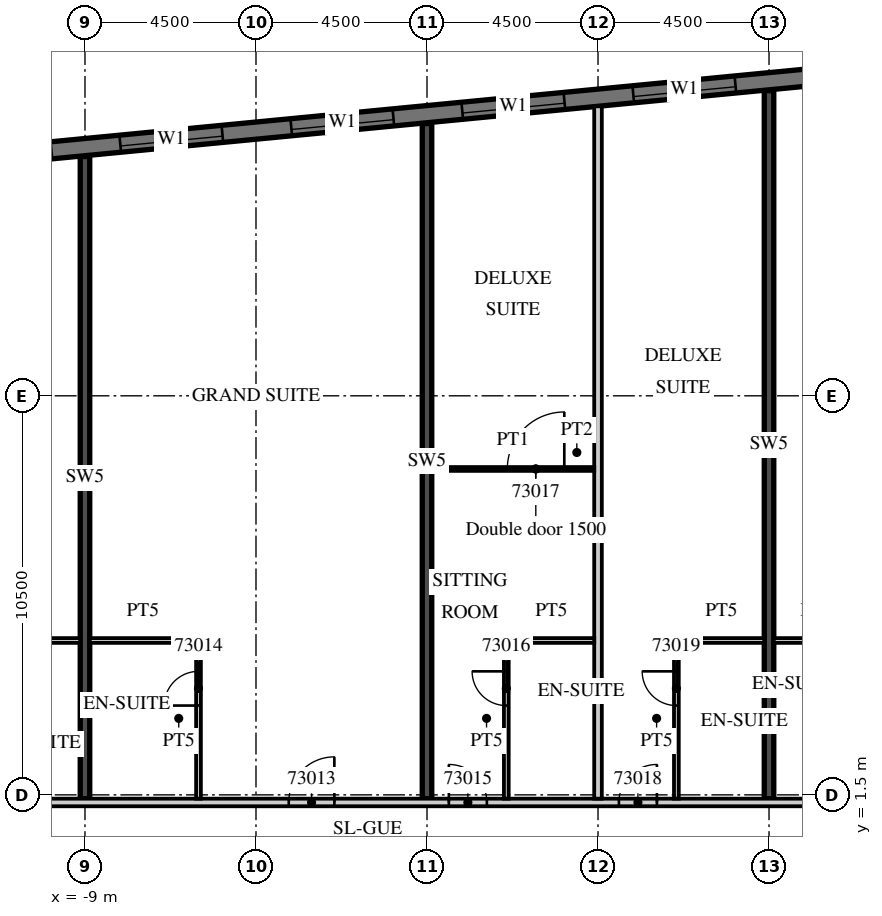
"""IFC4 building model, lengths in metres.
Left out: names, types, materials, properties, quantities, classifications, styles, units other than length and angle.
Written with IfcOpenShell. Run it as: python <this file> out.ifc"""

import sys

from ifc_helpers import new_model, si_unit, direction, frame, frame_2d, origin, place, context, subcontext, project, spatial, rectangle, extrude, element, fill, save


model = new_model("IFC4")
c1 = context("Model", 3, precision=1e-05, world=origin(), true_north=direction((0.0, 1.0)))
c2 = subcontext(c1, "Body", "Model", "MODEL_VIEW")
j1 = project(units=[si_unit("LENGTHUNIT", "METRE"), si_unit("PLANEANGLEUNIT", "RADIAN")], contexts=[c1])
p1 = place(None, origin())
s1 = spatial("IfcSite", under=j1, at=p1, CompositionType="ELEMENT")
p2 = place(p1, origin())
s2 = spatial("IfcBuilding", under=s1, at=p2, CompositionType="ELEMENT")
p3 = place(p2, frame((0.0, 0.0, 291.6)))
s3 = spatial("IfcBuildingStorey", under=s2, at=p3, CompositionType="ELEMENT", Elevation=291.6)
p4 = place(p3, frame((-9.0, 1.4, 0.0), z_axis=(0.0, 0.0, 1.0), x_axis=(0.0, 1.0, 0.0)))
e1 = element("IfcWall", 1, at=p4, inside=s3, PredefinedType="SHEAR", context=c2, shape_type="SweptSolid", body=[
    extrude(rectangle(XDim=16.896, YDim=0.25, at=frame_2d((8.448, 0.0))), origin(), (0.0, 0.0, 1.0), 3.3),
])
p5 = place(p3, frame((0.0, 1.4, 0.0), z_axis=(0.0, 0.0, 1.0), x_axis=(0.0, 1.0, 0.0)))
e2 = element("IfcWall", 2, at=p5, inside=s3, PredefinedType="SHEAR", context=c2, shape_type="SweptSolid", body=[
    extrude(rectangle(XDim=17.763, YDim=0.25, at=frame_2d((8.881, 0.0))), origin(), (0.0, 0.0, 1.0), 3.3),
])
p6 = place(p3, frame((9.0, 1.4, 0.0), z_axis=(0.0, 0.0, 1.0), x_axis=(0.0, 1.0, 0.0)))
e3 = element("IfcWall", 3, at=p6, inside=s3, PredefinedType="SHEAR", context=c2, shape_type="SweptSolid", body=[
    extrude(rectangle(XDim=18.629, YDim=0.25, at=frame_2d((9.315, 0.0))), origin(), (0.0, 0.0, 1.0), 3.3),
])
p7 = place(p3, frame((13.521, 20.713, 0.0), z_axis=(0.0, 0.0, 1.0), x_axis=(-0.995396277313, -0.095844932638, 0.0)))
e4 = element("IfcWall", 4, at=p7, inside=s3, PredefinedType="SOLIDWALL", context=c2, shape_type="SweptSolid", body=[
    extrude(rectangle(XDim=51.495, YDim=0.45, at=frame_2d((25.748, 0.0))), origin(), (0.0, 0.0, 1.0), 3.02),
])
p8 = place(p7, frame((0.91, 0.0, 0.45)))
e5 = element("IfcOpeningElement", 5, at=p8, cuts=e4, PredefinedType="OPENING", context=c2, shape_type="SweptSolid", body=[
    extrude(rectangle(XDim=2.7, YDim=2.25, at=frame_2d((1.35, 1.125))), frame((0.0, 0.235, 0.0), z_axis=(0.0, -1.0, 0.0), x_axis=(1.0, 0.0, 0.0)), (0.0, 0.0, 1.0), 0.47),
])
p9 = place(p7, frame((5.431, 0.0, 0.45)))
e6 = element("IfcOpeningElement", 6, at=p9, cuts=e4, PredefinedType="OPENING", context=c2, shape_type="SweptSolid", body=[
    extrude(rectangle(XDim=2.7, YDim=2.25, at=frame_2d((1.35, 1.125))), frame((0.0, 0.235, 0.0), z_axis=(0.0, -1.0, 0.0), x_axis=(1.0, 0.0, 0.0)), (0.0, 0.0, 1.0), 0.47),
])
p10 = place(p7, frame((9.952, 0.0, 0.45)))
e7 = element("IfcOpeningElement", 7, at=p10, cuts=e4, PredefinedType="OPENING", context=c2, shape_type="SweptSolid", body=[
    extrude(rectangle(XDim=2.7, YDim=2.25, at=frame_2d((1.35, 1.125))), frame((0.0, 0.235, 0.0), z_axis=(0.0, -1.0, 0.0), x_axis=(1.0, 0.0, 0.0)), (0.0, 0.0, 1.0), 0.47),
])
p11 = place(p7, frame((14.473, 0.0, 0.45)))
e8 = element("IfcOpeningElement", 8, at=p11, cuts=e4, PredefinedType="OPENING", context=c2, shape_type="SweptSolid", body=[
    extrude(rectangle(XDim=2.7, YDim=2.25, at=frame_2d((1.35, 1.125))), frame((0.0, 0.235, 0.0), z_axis=(0.0, -1.0, 0.0), x_axis=(1.0, 0.0, 0.0)), (0.0, 0.0, 1.0), 0.47),
])
p12 = place(p7, frame((18.994, 0.0, 0.45)))
e9 = element("IfcOpeningElement", 9, at=p12, cuts=e4, PredefinedType="OPENING", context=c2, shape_type="SweptSolid", body=[
    extrude(rectangle(XDim=2.7, YDim=2.25, at=frame_2d((1.35, 1.125))), frame((0.0, 0.235, 0.0), z_axis=(0.0, -1.0, 0.0), x_axis=(1.0, 0.0, 0.0)), (0.0, 0.0, 1.0), 0.47),
])
p13 = place(p7, frame((23.514, 0.0, 0.45)))
e10 = element("IfcOpeningElement", 10, at=p13, cuts=e4, PredefinedType="OPENING", context=c2, shape_type="SweptSolid", body=[
    extrude(rectangle(XDim=2.7, YDim=2.25, at=frame_2d((1.35, 1.125))), frame((0.0, 0.235, 0.0), z_axis=(0.0, -1.0, 0.0), x_axis=(1.0, 0.0, 0.0)), (0.0, 0.0, 1.0), 0.47),
])
p14 = place(p7, frame((28.035, 0.0, 0.45)))
e11 = element("IfcOpeningElement", 11, at=p14, cuts=e4, PredefinedType="OPENING", context=c2, shape_type="SweptSolid", body=[
    extrude(rectangle(XDim=2.7, YDim=2.25, at=frame_2d((1.35, 1.125))), frame((0.0, 0.235, 0.0), z_axis=(0.0, -1.0, 0.0), x_axis=(1.0, 0.0, 0.0)), (0.0, 0.0, 1.0), 0.47),
])
p15 = place(p7, frame((32.556, 0.0, 0.45)))
e12 = element("IfcOpeningElement", 12, at=p15, cuts=e4, PredefinedType="OPENING", context=c2, shape_type="SweptSolid", body=[
    extrude(rectangle(XDim=2.7, YDim=2.25, at=frame_2d((1.35, 1.125))), frame((0.0, 0.235, 0.0), z_axis=(0.0, -1.0, 0.0), x_axis=(1.0, 0.0, 0.0)), (0.0, 0.0, 1.0), 0.47),
])
p16 = place(p7, frame((37.077, 0.0, 0.45)))
e13 = element("IfcOpeningElement", 13, at=p16, cuts=e4, PredefinedType="OPENING", context=c2, shape_type="SweptSolid", body=[
    extrude(rectangle(XDim=2.7, YDim=2.25, at=frame_2d((1.35, 1.125))), frame((0.0, 0.235, 0.0), z_axis=(0.0, -1.0, 0.0), x_axis=(1.0, 0.0, 0.0)), (0.0, 0.0, 1.0), 0.47),
])
p17 = place(p7, frame((41.598, 0.0, 0.45)))
e14 = element("IfcOpeningElement", 14, at=p17, cuts=e4, PredefinedType="OPENING", context=c2, shape_type="SweptSolid", body=[
    extrude(rectangle(XDim=2.7, YDim=2.25, at=frame_2d((1.35, 1.125))), frame((0.0, 0.235, 0.0), z_axis=(0.0, -1.0, 0.0), x_axis=(1.0, 0.0, 0.0)), (0.0, 0.0, 1.0), 0.47),
])
p18 = place(p7, frame((46.118, 0.0, 0.45)))
e15 = element("IfcOpeningElement", 15, at=p18, cuts=e4, PredefinedType="OPENING", context=c2, shape_type="SweptSolid", body=[
    extrude(rectangle(XDim=2.7, YDim=2.25, at=frame_2d((1.35, 1.125))), frame((0.0, 0.235, 0.0), z_axis=(0.0, -1.0, 0.0), x_axis=(1.0, 0.0, 0.0)), (0.0, 0.0, 1.0), 0.47),
])
p19 = place(p3, frame((-39.909, 1.3, 0.0), z_axis=(0.0, 0.0, 1.0), x_axis=(1.0, 0.0, 0.0)))
e16 = element("IfcWall", 16, at=p19, inside=s3, PredefinedType="PARTITIONING", context=c2, shape_type="SweptSolid", body=[
    extrude(rectangle(XDim=53.409, YDim=0.2, at=frame_2d((26.705, 0.0))), origin(), (0.0, 0.0, 1.0), 3.02),
])
p20 = place(p19, frame((0.255, 0.0, 0.0)))
e17 = element("IfcOpeningElement", 17, at=p20, cuts=e16, PredefinedType="OPENING", context=c2, shape_type="SweptSolid", body=[
    extrude(rectangle(XDim=0.9, YDim=2.1, at=frame_2d((0.45, 1.05))), frame((0.0, 0.11, 0.0), z_axis=(0.0, -1.0, 0.0), x_axis=(1.0, 0.0, 0.0)), (0.0, 0.0, 1.0), 0.22),
])
p21 = place(p19, frame((6.347, 0.0, 0.0)))
e18 = element("IfcOpeningElement", 18, at=p21, cuts=e16, PredefinedType="OPENING", context=c2, shape_type="SweptSolid", body=[
    extrude(rectangle(XDim=1.2, YDim=2.1, at=frame_2d((0.6, 1.05))), frame((0.0, 0.11, 0.0), z_axis=(0.0, -1.0, 0.0), x_axis=(1.0, 0.0, 0.0)), (0.0, 0.0, 1.0), 0.22),
])
p22 = place(p19, frame((13.484, 0.0, 0.0)))
e19 = element("IfcOpeningElement", 19, at=p22, cuts=e16, PredefinedType="OPENING", context=c2, shape_type="SweptSolid", body=[
    extrude(rectangle(XDim=1.0, YDim=2.1, at=frame_2d((0.5, 1.05))), frame((0.0, 0.11, 0.0), z_axis=(0.0, -1.0, 0.0), x_axis=(1.0, 0.0, 0.0)), (0.0, 0.0, 1.0), 0.22),
])
p23 = place(p19, frame((20.334, 0.0, 0.0)))
e20 = element("IfcOpeningElement", 20, at=p23, cuts=e16, PredefinedType="OPENING", context=c2, shape_type="SweptSolid", body=[
    extrude(rectangle(XDim=1.0, YDim=2.1, at=frame_2d((0.5, 1.05))), frame((0.0, 0.11, 0.0), z_axis=(0.0, -1.0, 0.0), x_axis=(1.0, 0.0, 0.0)), (0.0, 0.0, 1.0), 0.22),
])
p24 = place(p19, frame((22.484, 0.0, 0.0)))
e21 = element("IfcOpeningElement", 21, at=p24, cuts=e16, PredefinedType="OPENING", context=c2, shape_type="SweptSolid", body=[
    extrude(rectangle(XDim=1.0, YDim=2.1, at=frame_2d((0.5, 1.05))), frame((0.0, 0.11, 0.0), z_axis=(0.0, -1.0, 0.0), x_axis=(1.0, 0.0, 0.0)), (0.0, 0.0, 1.0), 0.22),
])
p25 = place(p19, frame((26.959, 0.0, 0.0)))
e22 = element("IfcOpeningElement", 22, at=p25, cuts=e16, PredefinedType="OPENING", context=c2, shape_type="SweptSolid", body=[
    extrude(rectangle(XDim=1.0, YDim=2.1, at=frame_2d((0.5, 1.05))), frame((0.0, 0.11, 0.0), z_axis=(0.0, -1.0, 0.0), x_axis=(1.0, 0.0, 0.0)), (0.0, 0.0, 1.0), 0.22),
])
p26 = place(p19, frame((36.271, 0.0, 0.0)))
e23 = element("IfcOpeningElement", 23, at=p26, cuts=e16, PredefinedType="OPENING", context=c2, shape_type="SweptSolid", body=[
    extrude(rectangle(XDim=1.2, YDim=2.1, at=frame_2d((0.6, 1.05))), frame((0.0, 0.11, 0.0), z_axis=(0.0, -1.0, 0.0), x_axis=(1.0, 0.0, 0.0)), (0.0, 0.0, 1.0), 0.22),
])
p27 = place(p19, frame((40.484, 0.0, 0.0)))
e24 = element("IfcOpeningElement", 24, at=p27, cuts=e16, PredefinedType="OPENING", context=c2, shape_type="SweptSolid", body=[
    extrude(rectangle(XDim=1.0, YDim=2.1, at=frame_2d((0.5, 1.05))), frame((0.0, 0.11, 0.0), z_axis=(0.0, -1.0, 0.0), x_axis=(1.0, 0.0, 0.0)), (0.0, 0.0, 1.0), 0.22),
])
p28 = place(p19, frame((44.959, 0.0, 0.0)))
e25 = element("IfcOpeningElement", 25, at=p28, cuts=e16, PredefinedType="OPENING", context=c2, shape_type="SweptSolid", body=[
    extrude(rectangle(XDim=1.0, YDim=2.1, at=frame_2d((0.5, 1.05))), frame((0.0, 0.11, 0.0), z_axis=(0.0, -1.0, 0.0), x_axis=(1.0, 0.0, 0.0)), (0.0, 0.0, 1.0), 0.22),
])
p29 = place(p19, frame((51.834, 0.0, 0.0)))
e26 = element("IfcOpeningElement", 26, at=p29, cuts=e16, PredefinedType="OPENING", context=c2, shape_type="SweptSolid", body=[
    extrude(rectangle(XDim=1.0, YDim=2.1, at=frame_2d((0.5, 1.05))), frame((0.0, 0.11, 0.0), z_axis=(0.0, -1.0, 0.0), x_axis=(1.0, 0.0, 0.0)), (0.0, 0.0, 1.0), 0.22),
])
p30 = place(p3, frame((-11.375, 5.562, 0.0), z_axis=(0.0, 0.0, 1.0), x_axis=(1.0, 0.0, 0.0)))
e27 = element("IfcWall", 27, at=p30, inside=s3, PredefinedType="PARTITIONING", context=c2, shape_type="SweptSolid", body=[
    extrude(rectangle(XDim=2.25, YDim=0.125, at=frame_2d((1.125, 0.0))), origin(), (0.0, 0.0, 1.0), 3.02),
])
p31 = place(p3, frame((-6.013, 1.4, 0.0), z_axis=(0.0, 0.0, 1.0), x_axis=(0.0, 1.0, 0.0)))
e28 = element("IfcWall", 28, at=p31, inside=s3, PredefinedType="PARTITIONING", context=c2, shape_type="SweptSolid", body=[
    extrude(rectangle(XDim=4.225, YDim=0.125, at=frame_2d((2.113, 0.0))), origin(), (0.0, 0.0, 1.0), 3.02),
])
p32 = place(p31, frame((2.45, 0.0, 0.0)))
e29 = element("IfcOpeningElement", 29, at=p32, cuts=e28, PredefinedType="OPENING", context=c2, shape_type="SweptSolid", body=[
    extrude(rectangle(XDim=0.9, YDim=2.1, at=frame_2d((0.45, 1.05))), frame((0.0, 0.073, 0.0), z_axis=(0.0, -1.0, 0.0), x_axis=(1.0, 0.0, 0.0)), (0.0, 0.0, 1.0), 0.145),
])
p33 = place(p3, frame((-8.875, 5.562, 0.0), z_axis=(0.0, 0.0, 1.0), x_axis=(1.0, 0.0, 0.0)))
e30 = element("IfcWall", 30, at=p33, inside=s3, PredefinedType="PARTITIONING", context=c2, shape_type="SweptSolid", body=[
    extrude(rectangle(XDim=2.8, YDim=0.125, at=frame_2d((1.4, 0.0))), origin(), (0.0, 0.0, 1.0), 3.02),
])
p34 = place(p3, frame((4.5, 1.4, 0.0), z_axis=(0.0, 0.0, 1.0), x_axis=(0.0, 1.0, 0.0)))
e31 = element("IfcWall", 31, at=p34, inside=s3, PredefinedType="PARTITIONING", context=c2, shape_type="SweptSolid", body=[
    extrude(rectangle(XDim=18.218, YDim=0.2, at=frame_2d((9.109, 0.0))), origin(), (0.0, 0.0, 1.0), 3.02),
])
p35 = place(p3, frame((2.087, 1.4, 0.0), z_axis=(0.0, 0.0, 1.0), x_axis=(0.0, 1.0, 0.0)))
e32 = element("IfcWall", 32, at=p35, inside=s3, PredefinedType="PARTITIONING", context=c2, shape_type="SweptSolid", body=[
    extrude(rectangle(XDim=4.225, YDim=0.125, at=frame_2d((2.113, 0.0))), origin(), (0.0, 0.0, 1.0), 3.02),
])
p36 = place(p35, frame((2.45, 0.0, 0.0)))
e33 = element("IfcOpeningElement", 33, at=p36, cuts=e32, PredefinedType="OPENING", context=c2, shape_type="SweptSolid", body=[
    extrude(rectangle(XDim=0.9, YDim=2.1, at=frame_2d((0.45, 1.05))), frame((0.0, 0.073, 0.0), z_axis=(0.0, -1.0, 0.0), x_axis=(1.0, 0.0, 0.0)), (0.0, 0.0, 1.0), 0.145),
])
p37 = place(p3, frame((2.15, 5.562, 0.0), z_axis=(0.0, 0.0, 1.0), x_axis=(1.0, 0.0, 0.0)))
e34 = element("IfcWall", 34, at=p37, inside=s3, PredefinedType="PARTITIONING", context=c2, shape_type="SweptSolid", body=[
    extrude(rectangle(XDim=2.25, YDim=0.125, at=frame_2d((1.125, 0.0))), origin(), (0.0, 0.0, 1.0), 3.02),
])
p38 = place(p3, frame((0.125, 10.075, 0.0), z_axis=(0.0, 0.0, 1.0), x_axis=(1.0, 0.0, 0.0)))
e35 = element("IfcWall", 35, at=p38, inside=s3, PredefinedType="PARTITIONING", context=c2, shape_type="SweptSolid", body=[
    extrude(rectangle(XDim=4.275, YDim=0.1, at=frame_2d((2.137, 0.0))), origin(), (0.0, 0.0, 1.0), 3.02),
])
p39 = place(p38, frame((1.988, 0.0, 0.0)))
e36 = element("IfcOpeningElement", 36, at=p39, cuts=e35, PredefinedType="OPENING", context=c2, shape_type="SweptSolid", body=[
    extrude(rectangle(XDim=1.5, YDim=2.1, at=frame_2d((0.75, 1.05))), frame((0.0, 0.06, 0.0), z_axis=(0.0, -1.0, 0.0), x_axis=(1.0, 0.0, 0.0)), (0.0, 0.0, 1.0), 0.12),
])
p40 = place(p3, frame((6.562, 1.4, 0.0), z_axis=(0.0, 0.0, 1.0), x_axis=(0.0, 1.0, 0.0)))
e37 = element("IfcWall", 37, at=p40, inside=s3, PredefinedType="PARTITIONING", context=c2, shape_type="SweptSolid", body=[
    extrude(rectangle(XDim=4.225, YDim=0.125, at=frame_2d((2.113, 0.0))), origin(), (0.0, 0.0, 1.0), 3.02),
])
p41 = place(p40, frame((2.45, 0.0, 0.0)))
e38 = element("IfcOpeningElement", 38, at=p41, cuts=e37, PredefinedType="OPENING", context=c2, shape_type="SweptSolid", body=[
    extrude(rectangle(XDim=0.9, YDim=2.1, at=frame_2d((0.45, 1.05))), frame((0.0, 0.073, 0.0), z_axis=(0.0, -1.0, 0.0), x_axis=(1.0, 0.0, 0.0)), (0.0, 0.0, 1.0), 0.145),
])
for number, where, z_axis, x_axis in (
    (39, (6.625, 5.562, 0.0), (0.0, 0.0, 1.0), (1.0, 0.0, 0.0)),
    (40, (9.125, 5.562, 0.0), (0.0, 0.0, 1.0), (1.0, 0.0, 0.0)),
):
    element("IfcWall", number, at=place(p3, frame(where, z_axis=z_axis, x_axis=x_axis)), inside=s3, PredefinedType="PARTITIONING", context=c2, shape_type="SweptSolid", body=[
        extrude(rectangle(XDim=2.25, YDim=0.125, at=frame_2d((1.125, 0.0))), origin(), (0.0, 0.0, 1.0), 3.02),
    ])
p42 = place(p9, origin())
e41 = element("IfcWindow", 41, at=p42, inside=s3, PartitioningType="SINGLE_PANEL", PredefinedType="WINDOW", context=c2, shape_type="SweptSolid", body=[
    extrude(rectangle(XDim=2.7, YDim=2.25, at=frame_2d((1.35, 1.125))), frame((0.0, 0.09, 0.0), z_axis=(0.0, -1.0, 0.0), x_axis=(1.0, 0.0, 0.0)), (0.0, 0.0, 1.0), 0.06),
])
fill(e6, e41)
p43 = place(p10, origin())
e42 = element("IfcWindow", 42, at=p43, inside=s3, PartitioningType="SINGLE_PANEL", PredefinedType="WINDOW", context=c2, shape_type="SweptSolid", body=[
    extrude(rectangle(XDim=2.7, YDim=2.25, at=frame_2d((1.35, 1.125))), frame((0.0, 0.09, 0.0), z_axis=(0.0, -1.0, 0.0), x_axis=(1.0, 0.0, 0.0)), (0.0, 0.0, 1.0), 0.06),
])
fill(e7, e42)
p44 = place(p11, origin())
e43 = element("IfcWindow", 43, at=p44, inside=s3, PartitioningType="SINGLE_PANEL", PredefinedType="WINDOW", context=c2, shape_type="SweptSolid", body=[
    extrude(rectangle(XDim=2.7, YDim=2.25, at=frame_2d((1.35, 1.125))), frame((0.0, 0.09, 0.0), z_axis=(0.0, -1.0, 0.0), x_axis=(1.0, 0.0, 0.0)), (0.0, 0.0, 1.0), 0.06),
])
fill(e8, e43)
p45 = place(p12, origin())
e44 = element("IfcWindow", 44, at=p45, inside=s3, PartitioningType="SINGLE_PANEL", PredefinedType="WINDOW", context=c2, shape_type="SweptSolid", body=[
    extrude(rectangle(XDim=2.7, YDim=2.25, at=frame_2d((1.35, 1.125))), frame((0.0, 0.09, 0.0), z_axis=(0.0, -1.0, 0.0), x_axis=(1.0, 0.0, 0.0)), (0.0, 0.0, 1.0), 0.06),
])
fill(e9, e44)
p46 = place(p26, origin())
e45 = element("IfcDoor", 45, at=p46, inside=s3, OperationType="SINGLE_SWING_RIGHT", PredefinedType="DOOR", context=c2, shape_type="SweptSolid", body=[
    extrude(rectangle(XDim=1.2, YDim=2.1, at=frame_2d((0.6, 1.05))), frame((0.0, 0.025, 0.0), z_axis=(0.0, -1.0, 0.0), x_axis=(1.0, 0.0, 0.0)), (0.0, 0.0, 1.0), 0.05),
])
fill(e23, e45)
p47 = place(p32, origin())
e46 = element("IfcDoor", 46, at=p47, inside=s3, OperationType="SINGLE_SWING_LEFT", PredefinedType="DOOR", context=c2, shape_type="SweptSolid", body=[
    extrude(rectangle(XDim=0.9, YDim=2.1, at=frame_2d((0.45, 1.05))), frame((0.0, 0.025, 0.0), z_axis=(0.0, -1.0, 0.0), x_axis=(1.0, 0.0, 0.0)), (0.0, 0.0, 1.0), 0.05),
])
fill(e29, e46)
p48 = place(p27, origin())
e47 = element("IfcDoor", 47, at=p48, inside=s3, OperationType="SINGLE_SWING_LEFT", PredefinedType="DOOR", context=c2, shape_type="SweptSolid", body=[
    extrude(rectangle(XDim=1.0, YDim=2.1, at=frame_2d((0.5, 1.05))), frame((0.0, 0.025, 0.0), z_axis=(0.0, -1.0, 0.0), x_axis=(1.0, 0.0, 0.0)), (0.0, 0.0, 1.0), 0.05),
])
fill(e24, e47)
p49 = place(p36, origin())
e48 = element("IfcDoor", 48, at=p49, inside=s3, OperationType="SINGLE_SWING_RIGHT", PredefinedType="DOOR", context=c2, shape_type="SweptSolid", body=[
    extrude(rectangle(XDim=0.9, YDim=2.1, at=frame_2d((0.45, 1.05))), frame((0.0, 0.025, 0.0), z_axis=(0.0, -1.0, 0.0), x_axis=(1.0, 0.0, 0.0)), (0.0, 0.0, 1.0), 0.05),
])
fill(e33, e48)
p50 = place(p39, origin())
e49 = element("IfcDoor", 49, at=p50, inside=s3, OperationType="SINGLE_SWING_RIGHT", PredefinedType="DOOR", context=c2, shape_type="SweptSolid", body=[
    extrude(rectangle(XDim=1.5, YDim=2.1, at=frame_2d((0.75, 1.05))), frame((0.0, 0.025, 0.0), z_axis=(0.0, -1.0, 0.0), x_axis=(1.0, 0.0, 0.0)), (0.0, 0.0, 1.0), 0.05),
])
fill(e36, e49)
p51 = place(p28, origin())
e50 = element("IfcDoor", 50, at=p51, inside=s3, OperationType="SINGLE_SWING_RIGHT", PredefinedType="DOOR", context=c2, shape_type="SweptSolid", body=[
    extrude(rectangle(XDim=1.0, YDim=2.1, at=frame_2d((0.5, 1.05))), frame((0.0, 0.025, 0.0), z_axis=(0.0, -1.0, 0.0), x_axis=(1.0, 0.0, 0.0)), (0.0, 0.0, 1.0), 0.05),
])
fill(e25, e50)
p52 = place(p41, origin())
e51 = element("IfcDoor", 51, at=p52, inside=s3, OperationType="SINGLE_SWING_RIGHT", PredefinedType="DOOR", context=c2, shape_type="SweptSolid", body=[
    extrude(rectangle(XDim=0.9, YDim=2.1, at=frame_2d((0.45, 1.05))), frame((0.0, 0.025, 0.0), z_axis=(0.0, -1.0, 0.0), x_axis=(1.0, 0.0, 0.0)), (0.0, 0.0, 1.0), 0.05),
])
fill(e38, e51)
save(model, sys.argv[1])
